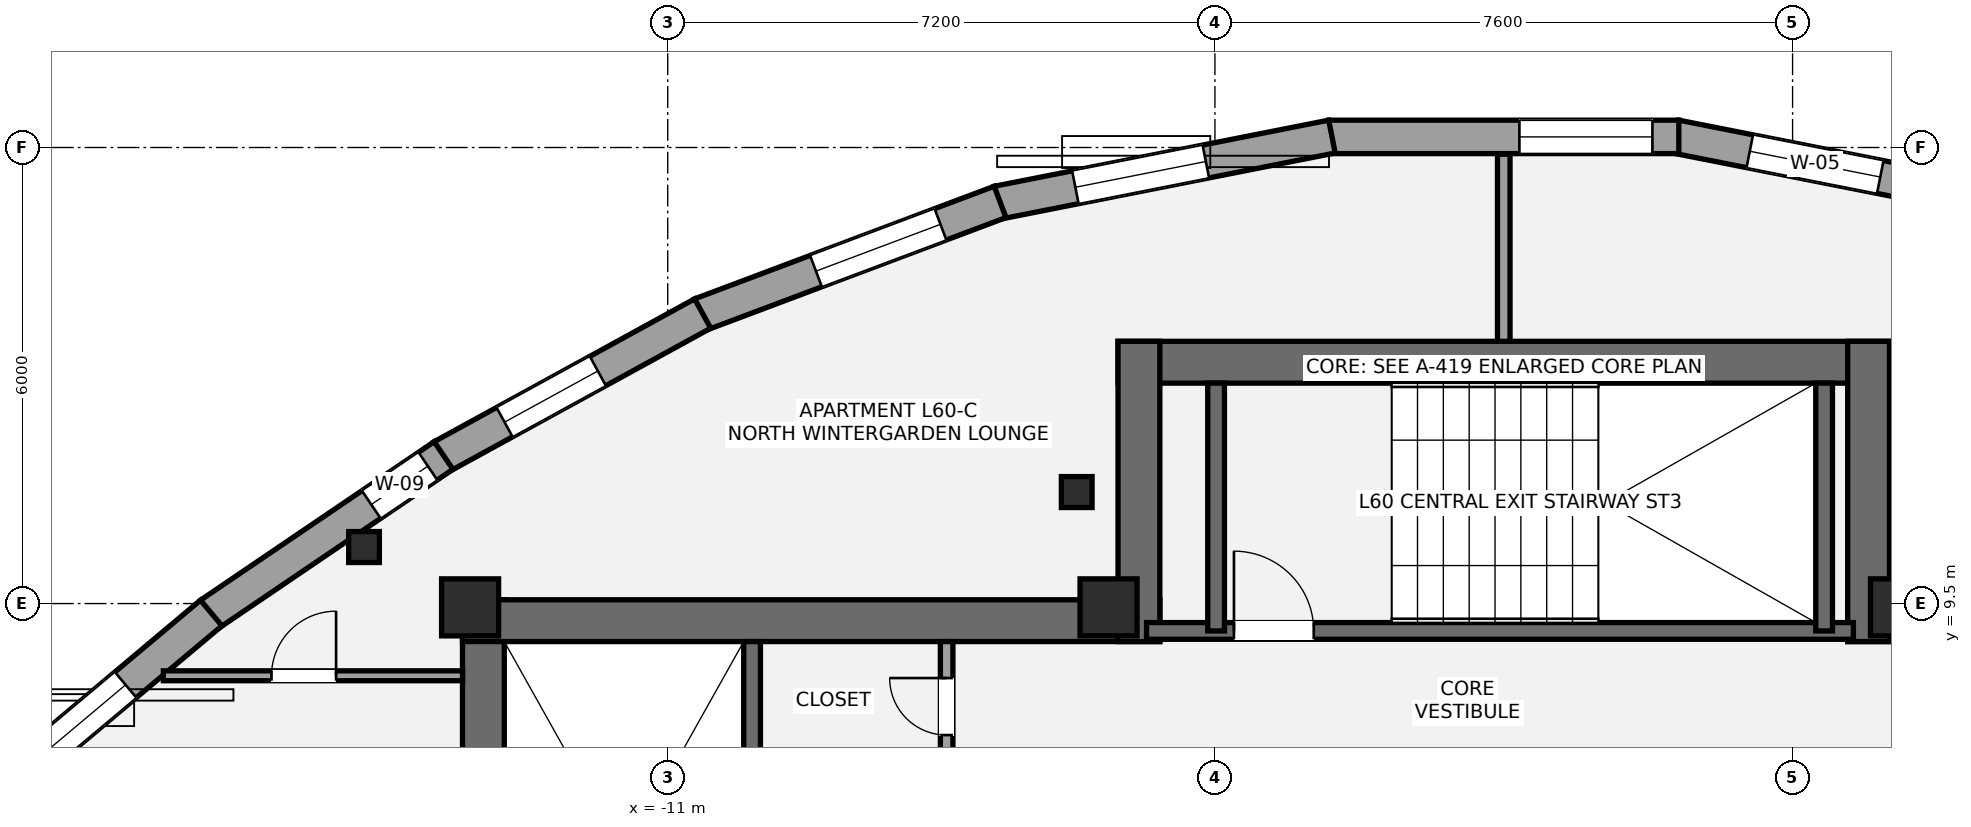
"""IFC4 building model, lengths in metres.
Left out: names, types, materials, properties, quantities, classifications, styles, units other than length and angle.
Written with IfcOpenShell. Run it as: python <this file> out.ifc"""

import sys

from ifc_helpers import new_model, si_unit, direction, frame, frame_2d, origin, origin_2d, place, context, subcontext, project, spatial, rectangle, i_section, extrude, element, fill, save


model = new_model("IFC4")
c1 = context("Model", 3, precision=1e-05, world=origin(), true_north=direction((0.0, 1.0)))
c2 = subcontext(c1, "Body", "Model", "MODEL_VIEW")
j1 = project(units=[si_unit("LENGTHUNIT", "METRE"), si_unit("PLANEANGLEUNIT", "RADIAN")], contexts=[c1])
p1 = place(None, origin())
s1 = spatial("IfcSite", under=j1, at=p1, CompositionType="ELEMENT")
p2 = place(p1, origin())
s2 = spatial("IfcBuilding", under=s1, at=p2, CompositionType="ELEMENT")
p3 = place(p2, frame((0.0, 0.0, 216.3)))
s3 = spatial("IfcBuildingStorey", under=s2, at=p3, CompositionType="ELEMENT", Elevation=216.3)
p4 = place(p3, frame((-13.425, 1.3, 0.0), z_axis=(0.0, 0.0, 1.0), x_axis=(0.0, 1.0, 0.0)))
e1 = element("IfcWall", 1, at=p4, inside=s3, PredefinedType="SHEAR", context=c2, shape_type="SweptSolid", body=[
    extrude(rectangle(XDim=8.25, YDim=0.55, at=frame_2d((4.125, 0.0))), origin(), (0.0, 0.0, 1.0), 3.15),
])
p5 = place(p3, frame((-13.7, 9.275, 0.0), z_axis=(0.0, 0.0, 1.0), x_axis=(1.0, 0.0, 0.0)))
e2 = element("IfcWall", 2, at=p5, inside=s3, PredefinedType="SHEAR", context=c2, shape_type="SweptSolid", body=[
    extrude(rectangle(XDim=9.175, YDim=0.55, at=frame_2d((4.587, 0.0))), origin(), (0.0, 0.0, 1.0), 3.15),
])
p6 = place(p3, frame((-9.89, 1.85, 0.0), z_axis=(0.0, 0.0, 1.0), x_axis=(0.0, 1.0, 0.0)))
e3 = element("IfcWall", 3, at=p6, inside=s3, PredefinedType="SHEAR", context=c2, shape_type="SweptSolid", body=[
    extrude(rectangle(XDim=7.15, YDim=0.22, at=frame_2d((3.575, 0.0))), origin(), (0.0, 0.0, 1.0), 3.15),
])
p7 = place(p3, frame((4.525, 9.275, 0.0), z_axis=(0.0, 0.0, 1.0), x_axis=(1.0, 0.0, 0.0)))
e4 = element("IfcWall", 4, at=p7, inside=s3, PredefinedType="SHEAR", context=c2, shape_type="SweptSolid", body=[
    extrude(rectangle(XDim=9.175, YDim=0.55, at=frame_2d((4.587, 0.0))), origin(), (0.0, 0.0, 1.0), 3.15),
])
p8 = place(p3, frame((-5.075, 12.675, 0.0), z_axis=(0.0, 0.0, 1.0), x_axis=(1.0, 0.0, 0.0)))
e5 = element("IfcWall", 5, at=p8, inside=s3, PredefinedType="SHEAR", context=c2, shape_type="SweptSolid", body=[
    extrude(rectangle(XDim=10.15, YDim=0.55, at=frame_2d((5.075, 0.0))), origin(), (0.0, 0.0, 1.0), 3.15),
])
for number, where, z_axis, x_axis in (
    (6, (-4.8, 9.0, 0.0), (0.0, 0.0, 1.0), (0.0, 1.0, 0.0)),
    (7, (4.8, 9.0, 0.0), (0.0, 0.0, 1.0), (0.0, 1.0, 0.0)),
):
    element("IfcWall", number, at=place(p3, frame(where, z_axis=z_axis, x_axis=x_axis)), inside=s3, PredefinedType="SHEAR", context=c2, shape_type="SweptSolid", body=[
        extrude(rectangle(XDim=3.95, YDim=0.55, at=frame_2d((1.975, 0.0))), origin(), (0.0, 0.0, 1.0), 3.15),
    ])
p9 = place(p3, frame((-4.7, 9.14, 0.0), z_axis=(0.0, 0.0, 1.0), x_axis=(1.0, 0.0, 0.0)))
e8 = element("IfcWall", 8, at=p9, inside=s3, PredefinedType="SHEAR", context=c2, shape_type="SweptSolid", body=[
    extrude(rectangle(XDim=9.3, YDim=0.22, at=frame_2d((4.65, 0.0))), origin(), (0.0, 0.0, 1.0), 3.15),
])
p10 = place(p9, frame((1.15, 0.0, 0.0)))
e9 = element("IfcOpeningElement", 9, at=p10, cuts=e8, PredefinedType="OPENING", context=c2, shape_type="SweptSolid", body=[
    extrude(rectangle(XDim=1.05, YDim=2.15, at=frame_2d((0.525, 1.075))), frame((0.0, 0.12, 0.0), z_axis=(0.0, -1.0, 0.0), x_axis=(1.0, 0.0, 0.0)), (0.0, 0.0, 1.0), 0.24),
])
for number, where, z_axis, x_axis in (
    (10, (-3.785, 9.14, 0.0), (0.0, 0.0, 1.0), (0.0, 1.0, 0.0)),
    (11, (4.215, 9.14, 0.0), (0.0, 0.0, 1.0), (0.0, 1.0, 0.0)),
):
    element("IfcWall", number, at=place(p3, frame(where, z_axis=z_axis, x_axis=x_axis)), inside=s3, PredefinedType="SHEAR", context=c2, shape_type="SweptSolid", body=[
        extrude(rectangle(XDim=3.26, YDim=0.22, at=frame_2d((1.63, 0.0))), origin(), (0.0, 0.0, 1.0), 3.15),
    ])
for number, where, z_axis, x_axis in (
    (12, (-13.6, 9.45, 0.0), (0.0, 0.0, 1.0), (1.0, 0.0, 0.0)),
    (13, (-5.2, 9.45, 0.0), (0.0, 0.0, 1.0), (1.0, 0.0, 0.0)),
    (14, (5.2, 9.45, 0.0), (0.0, 0.0, 1.0), (1.0, 0.0, 0.0)),
):
    element("IfcColumn", number, at=place(p3, frame(where, z_axis=z_axis, x_axis=x_axis)), inside=s3, PredefinedType="PILASTER", context=c2, shape_type="SweptSolid", body=[
        extrude(rectangle(XDim=0.75, YDim=0.75, at=origin_2d()), origin(), (0.0, 0.0, 1.0), 3.15),
    ])
for number, where, z_axis, x_axis in (
    (15, (-5.619, 10.967, 0.0), (0.0, 0.0, 1.0), (1.0, 0.0, 0.0)),
    (16, (-14.996, 10.244, 0.0), (0.0, 0.0, 1.0), (1.0, 0.0, 0.0)),
):
    element("IfcColumn", number, at=place(p3, frame(where, z_axis=z_axis, x_axis=x_axis)), inside=s3, PredefinedType="COLUMN", context=c2, shape_type="SweptSolid", body=[
        extrude(i_section(OverallWidth=0.404, OverallDepth=0.407, WebThickness=0.027, FlangeThickness=0.044, at=origin_2d()), origin(), (0.0, 0.0, 1.0), 3.15),
    ])
p11 = place(p3, frame((2.26, 15.644, 0.0), z_axis=(0.0, 0.0, 1.0), x_axis=(0.981032244947, -0.193844613996, 0.0)))
e17 = element("IfcWall", 17, at=p11, inside=s3, PredefinedType="STANDARD", context=c2, shape_type="SweptSolid", body=[
    extrude(rectangle(XDim=4.486, YDim=0.44, at=frame_2d((2.243, 0.0))), origin(), (0.0, 0.0, 1.0), 2.336),
])
p12 = place(p11, frame((0.995, 0.0, 0.55)))
e18 = element("IfcOpeningElement", 18, at=p12, cuts=e17, PredefinedType="OPENING", context=c2, shape_type="SweptSolid", body=[
    extrude(rectangle(XDim=1.75, YDim=1.55, at=frame_2d((0.875, 0.775))), frame((0.0, 0.23, 0.0), z_axis=(0.0, -1.0, 0.0), x_axis=(1.0, 0.0, 0.0)), (0.0, 0.0, 1.0), 0.46),
])
p13 = place(p3, frame((-2.303, 15.64, 0.0), z_axis=(0.0, 0.0, 1.0), x_axis=(1.0, 0.0, 0.0)))
e19 = element("IfcWall", 19, at=p13, inside=s3, PredefinedType="STANDARD", context=c2, shape_type="SweptSolid", body=[
    extrude(rectangle(XDim=4.606, YDim=0.44, at=frame_2d((2.303, 0.0))), origin(), (0.0, 0.0, 1.0), 2.336),
])
p14 = place(p13, frame((2.509, 0.0, 0.55)))
e20 = element("IfcOpeningElement", 20, at=p14, cuts=e19, PredefinedType="OPENING", context=c2, shape_type="SweptSolid", body=[
    extrude(rectangle(XDim=1.75, YDim=1.55, at=frame_2d((0.875, 0.775))), frame((0.0, 0.23, 0.0), z_axis=(0.0, -1.0, 0.0), x_axis=(1.0, 0.0, 0.0)), (0.0, 0.0, 1.0), 0.46),
])
p15 = place(p3, frame((-6.662, 14.774, 0.0), z_axis=(0.0, 0.0, 1.0), x_axis=(0.981032244947, 0.193844613996, 0.0)))
e21 = element("IfcWall", 21, at=p15, inside=s3, PredefinedType="STANDARD", context=c2, shape_type="SweptSolid", body=[
    extrude(rectangle(XDim=4.486, YDim=0.44, at=frame_2d((2.243, 0.0))), origin(), (0.0, 0.0, 1.0), 2.336),
])
p16 = place(p15, frame((1.045, 0.0, 0.55)))
e22 = element("IfcOpeningElement", 22, at=p16, cuts=e21, PredefinedType="OPENING", context=c2, shape_type="SweptSolid", body=[
    extrude(rectangle(XDim=1.75, YDim=1.55, at=frame_2d((0.875, 0.775))), frame((0.0, 0.23, 0.0), z_axis=(0.0, -1.0, 0.0), x_axis=(1.0, 0.0, 0.0)), (0.0, 0.0, 1.0), 0.46),
])
p17 = place(p3, frame((-10.569, 13.302, 0.0), z_axis=(0.0, 0.0, 1.0), x_axis=(0.936069207768, 0.351815915314, 0.0)))
e23 = element("IfcWall", 23, at=p17, inside=s3, PredefinedType="STANDARD", context=c2, shape_type="SweptSolid", body=[
    extrude(rectangle(XDim=4.211, YDim=0.44, at=frame_2d((2.105, 0.0))), origin(), (0.0, 0.0, 1.0), 2.336),
])
p18 = place(p17, frame((1.623, 0.0, 0.55)))
e24 = element("IfcOpeningElement", 24, at=p18, cuts=e23, PredefinedType="OPENING", context=c2, shape_type="SweptSolid", body=[
    extrude(rectangle(XDim=1.75, YDim=1.55, at=frame_2d((0.875, 0.775))), frame((0.0, 0.23, 0.0), z_axis=(0.0, -1.0, 0.0), x_axis=(1.0, 0.0, 0.0)), (0.0, 0.0, 1.0), 0.46),
])
p19 = place(p3, frame((-13.967, 11.437, 0.0), z_axis=(0.0, 0.0, 1.0), x_axis=(0.87688122565, 0.480707100117, 0.0)))
e25 = element("IfcWall", 25, at=p19, inside=s3, PredefinedType="STANDARD", context=c2, shape_type="SweptSolid", body=[
    extrude(rectangle(XDim=3.908, YDim=0.44, at=frame_2d((1.954, 0.0))), origin(), (0.0, 0.0, 1.0), 2.336),
])
p20 = place(p19, frame((0.935, 0.0, 0.55)))
e26 = element("IfcOpeningElement", 26, at=p20, cuts=e25, PredefinedType="OPENING", context=c2, shape_type="SweptSolid", body=[
    extrude(rectangle(XDim=1.4, YDim=1.55, at=frame_2d((0.7, 0.775))), frame((0.0, 0.23, 0.0), z_axis=(0.0, -1.0, 0.0), x_axis=(1.0, 0.0, 0.0)), (0.0, 0.0, 1.0), 0.46),
])
p21 = place(p3, frame((-17.024, 9.362, 0.0), z_axis=(0.0, 0.0, 1.0), x_axis=(0.827595704154, 0.561324639105, 0.0)))
e27 = element("IfcWall", 27, at=p21, inside=s3, PredefinedType="STANDARD", context=c2, shape_type="SweptSolid", body=[
    extrude(rectangle(XDim=3.715, YDim=0.44, at=frame_2d((1.858, 0.0))), origin(), (0.0, 0.0, 1.0), 2.336),
])
p22 = place(p21, frame((2.566, 0.0, 0.58)))
e28 = element("IfcOpeningElement", 28, at=p22, cuts=e27, PredefinedType="OPENING", context=c2, shape_type="SweptSolid", body=[
    extrude(rectangle(XDim=0.9, YDim=1.35, at=frame_2d((0.45, 0.675))), frame((0.0, 0.23, 0.0), z_axis=(0.0, -1.0, 0.0), x_axis=(1.0, 0.0, 0.0)), (0.0, 0.0, 1.0), 0.46),
])
p23 = place(p3, frame((-19.776, 7.052, 0.0), z_axis=(0.0, 0.0, 1.0), x_axis=(0.766063904081, 0.642764416302, 0.0)))
e29 = element("IfcWall", 29, at=p23, inside=s3, PredefinedType="STANDARD", context=c2, shape_type="SweptSolid", body=[
    extrude(rectangle(XDim=3.615, YDim=0.44, at=frame_2d((1.808, 0.0))), origin(), (0.0, 0.0, 1.0), 2.336),
])
p24 = place(p23, frame((0.396, 0.0, 0.55)))
e30 = element("IfcOpeningElement", 30, at=p24, cuts=e29, PredefinedType="OPENING", context=c2, shape_type="SweptSolid", body=[
    extrude(rectangle(XDim=1.75, YDim=1.55, at=frame_2d((0.875, 0.775))), frame((0.0, 0.23, 0.0), z_axis=(0.0, -1.0, 0.0), x_axis=(1.0, 0.0, 0.0)), (0.0, 0.0, 1.0), 0.46),
])
p25 = place(p3, frame((-7.33, 7.42, 0.0), z_axis=(0.0, 0.0, 1.0), x_axis=(0.0, 1.0, 0.0)))
e31 = element("IfcWall", 31, at=p25, inside=s3, PredefinedType="PARTITIONING", context=c2, shape_type="SweptSolid", body=[
    extrude(rectangle(XDim=1.58, YDim=0.165, at=frame_2d((0.79, 0.0))), origin(), (0.0, 0.0, 1.0), 2.97),
])
p26 = place(p25, frame((0.35, 0.0, 0.0)))
e32 = element("IfcOpeningElement", 32, at=p26, cuts=e31, PredefinedType="OPENING", context=c2, shape_type="SweptSolid", body=[
    extrude(rectangle(XDim=0.75, YDim=2.1, at=frame_2d((0.375, 1.05))), frame((0.0, 0.093, 0.0), z_axis=(0.0, -1.0, 0.0), x_axis=(1.0, 0.0, 0.0)), (0.0, 0.0, 1.0), 0.185),
])
p27 = place(p3, frame((0.0, 12.95, 0.0), z_axis=(0.0, 0.0, 1.0), x_axis=(0.0, 1.0, 0.0)))
e33 = element("IfcWall", 33, at=p27, inside=s3, PredefinedType="PARTITIONING", context=c2, shape_type="SweptSolid", body=[
    extrude(rectangle(XDim=2.462, YDim=0.165, at=frame_2d((1.231, 0.0))), origin(), (0.0, 0.0, 1.0), 2.97),
])
p28 = place(p3, frame((-17.636, 8.55, 0.0), z_axis=(0.0, 0.0, 1.0), x_axis=(1.0, 0.0, 0.0)))
e34 = element("IfcWall", 34, at=p28, inside=s3, PredefinedType="PARTITIONING", context=c2, shape_type="SweptSolid", body=[
    extrude(rectangle(XDim=3.936, YDim=0.13, at=frame_2d((1.968, 0.0))), origin(), (0.0, 0.0, 1.0), 2.423),
])
p29 = place(p28, frame((1.423, 0.0, 0.0)))
e35 = element("IfcOpeningElement", 35, at=p29, cuts=e34, PredefinedType="OPENING", context=c2, shape_type="SweptSolid", body=[
    extrude(rectangle(XDim=0.85, YDim=2.1, at=frame_2d((0.425, 1.05))), frame((0.0, 0.075, 0.0), z_axis=(0.0, -1.0, 0.0), x_axis=(1.0, 0.0, 0.0)), (0.0, 0.0, 1.0), 0.15),
])
p30 = place(p12, origin())
e36 = element("IfcWindow", 36, at=p30, inside=s3, PartitioningType="SINGLE_PANEL", PredefinedType="WINDOW", context=c2, shape_type="SweptSolid", body=[
    extrude(rectangle(XDim=1.75, YDim=1.55, at=frame_2d((0.875, 0.775))), frame((0.0, -0.01, 0.0), z_axis=(0.0, -1.0, 0.0), x_axis=(1.0, 0.0, 0.0)), (0.0, 0.0, 1.0), 0.06),
])
fill(e18, e36)
p31 = place(p14, origin())
e37 = element("IfcWindow", 37, at=p31, inside=s3, PartitioningType="SINGLE_PANEL", PredefinedType="WINDOW", context=c2, shape_type="SweptSolid", body=[
    extrude(rectangle(XDim=1.75, YDim=1.55, at=frame_2d((0.875, 0.775))), frame((0.0, -0.01, 0.0), z_axis=(0.0, -1.0, 0.0), x_axis=(1.0, 0.0, 0.0)), (0.0, 0.0, 1.0), 0.06),
])
fill(e20, e37)
p32 = place(p16, origin())
e38 = element("IfcWindow", 38, at=p32, inside=s3, PartitioningType="SINGLE_PANEL", PredefinedType="WINDOW", context=c2, shape_type="SweptSolid", body=[
    extrude(rectangle(XDim=1.75, YDim=1.55, at=frame_2d((0.875, 0.775))), frame((0.0, -0.01, 0.0), z_axis=(0.0, -1.0, 0.0), x_axis=(1.0, 0.0, 0.0)), (0.0, 0.0, 1.0), 0.06),
])
fill(e22, e38)
p33 = place(p18, origin())
e39 = element("IfcWindow", 39, at=p33, inside=s3, PartitioningType="SINGLE_PANEL", PredefinedType="WINDOW", context=c2, shape_type="SweptSolid", body=[
    extrude(rectangle(XDim=1.75, YDim=1.55, at=frame_2d((0.875, 0.775))), frame((0.0, -0.01, 0.0), z_axis=(0.0, -1.0, 0.0), x_axis=(1.0, 0.0, 0.0)), (0.0, 0.0, 1.0), 0.06),
])
fill(e24, e39)
p34 = place(p20, origin())
e40 = element("IfcWindow", 40, at=p34, inside=s3, PartitioningType="SINGLE_PANEL", PredefinedType="WINDOW", context=c2, shape_type="SweptSolid", body=[
    extrude(rectangle(XDim=1.4, YDim=1.55, at=frame_2d((0.7, 0.775))), frame((0.0, -0.01, 0.0), z_axis=(0.0, -1.0, 0.0), x_axis=(1.0, 0.0, 0.0)), (0.0, 0.0, 1.0), 0.06),
])
fill(e26, e40)
p35 = place(p22, origin())
e41 = element("IfcWindow", 41, at=p35, inside=s3, PartitioningType="SINGLE_PANEL", PredefinedType="WINDOW", context=c2, shape_type="SweptSolid", body=[
    extrude(rectangle(XDim=0.9, YDim=1.35, at=frame_2d((0.45, 0.675))), frame((0.0, -0.01, 0.0), z_axis=(0.0, -1.0, 0.0), x_axis=(1.0, 0.0, 0.0)), (0.0, 0.0, 1.0), 0.06),
])
fill(e28, e41)
p36 = place(p24, origin())
e42 = element("IfcWindow", 42, at=p36, inside=s3, PartitioningType="SINGLE_PANEL", PredefinedType="WINDOW", context=c2, shape_type="SweptSolid", body=[
    extrude(rectangle(XDim=1.75, YDim=1.55, at=frame_2d((0.875, 0.775))), frame((0.0, -0.01, 0.0), z_axis=(0.0, -1.0, 0.0), x_axis=(1.0, 0.0, 0.0)), (0.0, 0.0, 1.0), 0.06),
])
fill(e30, e42)
p37 = place(p10, origin())
e43 = element("IfcDoor", 43, at=p37, inside=s3, OperationType="SINGLE_SWING_LEFT", PredefinedType="DOOR", context=c2, shape_type="SweptSolid", body=[
    extrude(rectangle(XDim=1.05, YDim=2.15, at=frame_2d((0.525, 1.075))), frame((0.0, 0.025, 0.0), z_axis=(0.0, -1.0, 0.0), x_axis=(1.0, 0.0, 0.0)), (0.0, 0.0, 1.0), 0.05),
])
fill(e9, e43)
p38 = place(p26, origin())
e44 = element("IfcDoor", 44, at=p38, inside=s3, OperationType="SINGLE_SWING_RIGHT", PredefinedType="DOOR", context=c2, shape_type="SweptSolid", body=[
    extrude(rectangle(XDim=0.75, YDim=2.1, at=frame_2d((0.375, 1.05))), frame((0.0, 0.025, 0.0), z_axis=(0.0, -1.0, 0.0), x_axis=(1.0, 0.0, 0.0)), (0.0, 0.0, 1.0), 0.05),
])
fill(e32, e44)
p39 = place(p29, origin())
e45 = element("IfcDoor", 45, at=p39, inside=s3, OperationType="SINGLE_SWING_RIGHT", PredefinedType="DOOR", context=c2, shape_type="SweptSolid", body=[
    extrude(rectangle(XDim=0.85, YDim=2.1, at=frame_2d((0.425, 1.05))), frame((0.0, 0.025, 0.0), z_axis=(0.0, -1.0, 0.0), x_axis=(1.0, 0.0, 0.0)), (0.0, 0.0, 1.0), 0.05),
])
fill(e35, e45)
save(model, sys.argv[1])
